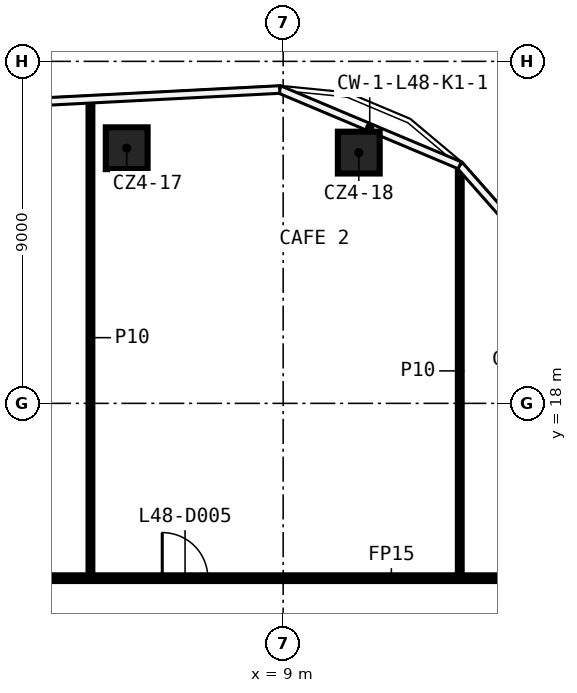
"""IFC4 building model, lengths in metres.
Left out: names, types, materials, properties, quantities, classifications, styles, units other than length and angle.
Written with IfcOpenShell. Run it as: python <this file> out.ifc"""

import sys

from ifc_helpers import new_model, si_unit, direction, frame, frame_2d, origin, origin_2d, place, context, subcontext, project, spatial, rectangle, extrude, element, fill, save


model = new_model("IFC4")
c1 = context("Model", 3, precision=1e-05, world=origin(), true_north=direction((0.0, 1.0)))
c2 = subcontext(c1, "Body", "Model", "MODEL_VIEW")
j1 = project(units=[si_unit("LENGTHUNIT", "METRE"), si_unit("PLANEANGLEUNIT", "RADIAN")], contexts=[c1])
p1 = place(None, origin())
s1 = spatial("IfcSite", under=j1, at=p1, CompositionType="ELEMENT")
p2 = place(p1, origin())
s2 = spatial("IfcBuilding", under=s1, at=p2, CompositionType="ELEMENT")
p3 = place(p2, frame((0.0, 0.0, 232.8)))
s3 = spatial("IfcBuildingStorey", under=s2, at=p3, CompositionType="ELEMENT", Elevation=232.8)
for number, where, z_axis, x_axis in (
    (1, (4.883, 24.714, 0.0), (0.0, 0.0, 1.0), (1.0, 0.0, 0.0)),
    (2, (10.99, 24.599, 0.0), (0.0, 0.0, 1.0), (1.0, 0.0, 0.0)),
):
    element("IfcColumn", number, at=place(p3, frame(where, z_axis=z_axis, x_axis=x_axis)), inside=s3, PredefinedType="COLUMN", context=c2, shape_type="SweptSolid", body=[
        extrude(rectangle(XDim=1.1, YDim=1.1, at=origin_2d()), origin(), (0.0, 0.0, 1.0), 3.75),
    ])
p4 = place(p3, frame((-2.075, 13.4, 0.0), z_axis=(0.0, 0.0, 1.0), x_axis=(1.0, 0.0, 0.0)))
e3 = element("IfcWall", 3, at=p4, inside=s3, PredefinedType="PARTITIONING", context=c2, shape_type="SweptSolid", body=[
    extrude(rectangle(XDim=18.55, YDim=0.15, at=frame_2d((9.275, 0.0))), origin(), (0.0, 0.0, 1.0), 3.75),
])
p5 = place(p4, frame((2.91, 0.0, 0.0)))
e4 = element("IfcOpeningElement", 4, at=p5, cuts=e3, PredefinedType="OPENING", context=c2, shape_type="SweptSolid", body=[
    extrude(rectangle(XDim=1.2, YDim=2.1, at=frame_2d((0.6, 1.05))), frame((0.0, 0.085, 0.0), z_axis=(0.0, -1.0, 0.0), x_axis=(1.0, 0.0, 0.0)), (0.0, 0.0, 1.0), 0.17),
])
p6 = place(p4, frame((7.894, 0.0, 0.0)))
e5 = element("IfcOpeningElement", 5, at=p6, cuts=e3, PredefinedType="OPENING", context=c2, shape_type="SweptSolid", body=[
    extrude(rectangle(XDim=1.2, YDim=2.1, at=frame_2d((0.6, 1.05))), frame((0.0, 0.085, 0.0), z_axis=(0.0, -1.0, 0.0), x_axis=(1.0, 0.0, 0.0)), (0.0, 0.0, 1.0), 0.17),
])
p7 = place(p3, frame((13.647, 13.475, 0.0), z_axis=(0.0, 0.0, 1.0), x_axis=(0.0, 1.0, 0.0)))
e6 = element("IfcWall", 6, at=p7, inside=s3, PredefinedType="PARTITIONING", context=c2, shape_type="SweptSolid", body=[
    extrude(rectangle(XDim=10.76, YDim=0.1, at=frame_2d((5.38, 0.0))), origin(), (0.0, 0.0, 1.0), 3.75),
])
p8 = place(p3, frame((3.929, 13.475, 0.0), z_axis=(0.0, 0.0, 1.0), x_axis=(0.0, 1.0, 0.0)))
e7 = element("IfcWall", 7, at=p8, inside=s3, PredefinedType="PARTITIONING", context=c2, shape_type="SweptSolid", body=[
    extrude(rectangle(XDim=12.508, YDim=0.1, at=frame_2d((6.254, 0.0))), origin(), (0.0, 0.0, 1.0), 3.75),
])
p9 = place(p6, origin())
e8 = element("IfcDoor", 8, at=p9, inside=s3, OperationType="SINGLE_SWING_RIGHT", PredefinedType="DOOR", context=c2, shape_type="SweptSolid", body=[
    extrude(rectangle(XDim=1.2, YDim=2.1, at=frame_2d((0.6, 1.05))), frame((0.0, 0.025, 0.0), z_axis=(0.0, -1.0, 0.0), x_axis=(1.0, 0.0, 0.0)), (0.0, 0.0, 1.0), 0.05),
])
fill(e5, e8)
save(model, sys.argv[1])
